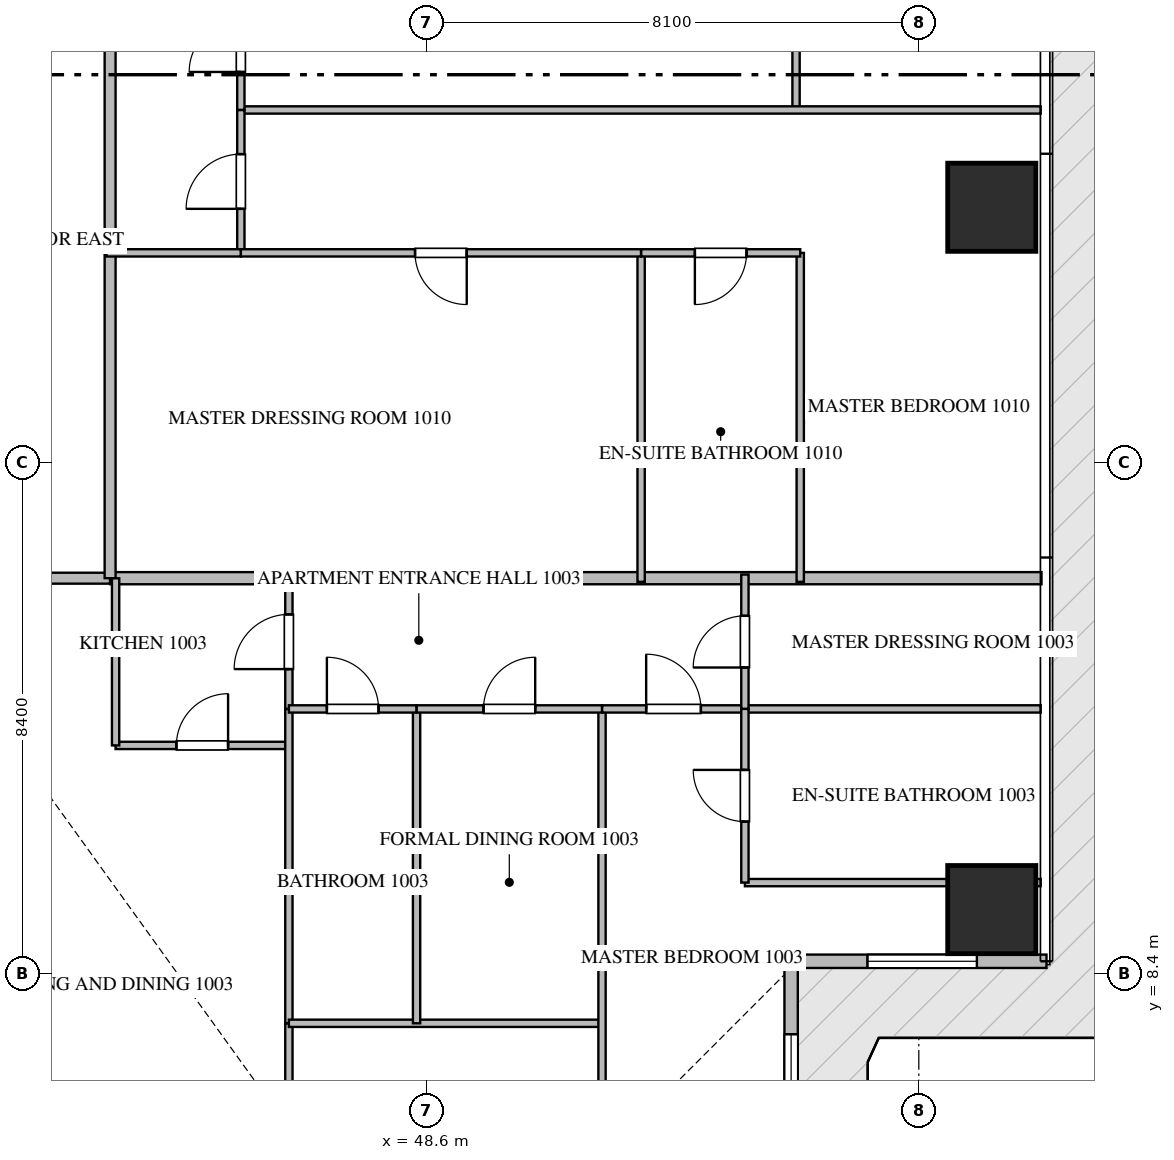
"""IFC4 building model, lengths in metres.
Left out: names, types, materials, properties, quantities, classifications, styles, units other than length and angle.
Written with IfcOpenShell. Run it as: python <this file> out.ifc"""

import sys

from ifc_helpers import new_model, si_unit, direction, frame, frame_2d, origin, origin_2d, place, context, subcontext, project, spatial, rectangle, extrude, source, transform, mapped, element, fill, save


model = new_model("IFC4")
c1 = context("Model", 3, precision=1e-05, world=origin(), true_north=direction((0.0, 1.0)))
c2 = subcontext(c1, "Body", "Model", "MODEL_VIEW")
j1 = project(units=[si_unit("LENGTHUNIT", "METRE"), si_unit("PLANEANGLEUNIT", "RADIAN")], contexts=[c1])
p1 = place(None, origin())
s1 = spatial("IfcSite", under=j1, at=p1, CompositionType="ELEMENT")
p2 = place(p1, origin())
s2 = spatial("IfcBuilding", under=s1, at=p2, CompositionType="ELEMENT")
p3 = place(p2, frame((0.0, 0.0, 45.45)))
s3 = spatial("IfcBuildingStorey", under=s2, at=p3, CompositionType="ELEMENT", Elevation=45.45)
m1 = source(origin(), c2, "Body", "SweptSolid", [
    extrude(rectangle(XDim=1.45, YDim=1.45, at=origin_2d()), origin(), (0.0, 0.0, 1.0), 3.75),
])
for number, where, z_axis, x_axis in (
    (1, (57.9, 9.45, -0.26), (0.0, 0.0, 1.0), (1.0, 0.0, 0.0)),
    (2, (57.9, 21.0, -0.26), (0.0, 0.0, 1.0), (1.0, 0.0, 0.0)),
):
    element("IfcColumn", number, at=place(p3, frame(where, z_axis=z_axis, x_axis=x_axis)), inside=s3, PredefinedType="COLUMN", context=c2, shape_type="MappedRepresentation", body=[
        mapped(m1, transform((0.0, 0.0, 0.0), scale=1.0)),
    ])
p4 = place(p3, frame((54.6, 4.51, 0.0), z_axis=(0.0, 0.0, 1.0), x_axis=(0.0, 1.0, 0.0)))
e3 = element("IfcWall", 3, at=p4, inside=s3, PredefinedType="ELEMENTEDWALL", context=c2, shape_type="SweptSolid", body=[
    extrude(rectangle(XDim=3.98, YDim=0.22, at=frame_2d((1.99, 0.0))), origin(), (0.0, 0.0, 1.0), 3.475),
])
p5 = place(p4, frame((1.09, 0.0, 0.65)))
e4 = element("IfcOpeningElement", 4, at=p5, cuts=e3, PredefinedType="OPENING", context=c2, shape_type="SweptSolid", body=[
    extrude(rectangle(XDim=1.8, YDim=2.1, at=frame_2d((0.9, 1.05))), frame((0.0, 0.12, 0.0), z_axis=(0.0, -1.0, 0.0), x_axis=(1.0, 0.0, 0.0)), (0.0, 0.0, 1.0), 0.24),
])
p6 = place(p3, frame((54.71, 8.6, 0.0), z_axis=(0.0, 0.0, 1.0), x_axis=(1.0, 0.0, 0.0)))
e5 = element("IfcWall", 5, at=p6, inside=s3, PredefinedType="ELEMENTEDWALL", context=c2, shape_type="SweptSolid", body=[
    extrude(rectangle(XDim=4.09, YDim=0.22, at=frame_2d((2.045, 0.0))), origin(), (0.0, 0.0, 1.0), 3.475),
])
p7 = place(p6, frame((1.145, 0.0, 0.65)))
e6 = element("IfcOpeningElement", 6, at=p7, cuts=e5, PredefinedType="OPENING", context=c2, shape_type="SweptSolid", body=[
    extrude(rectangle(XDim=1.8, YDim=2.1, at=frame_2d((0.9, 1.05))), frame((0.0, 0.12, 0.0), z_axis=(0.0, -1.0, 0.0), x_axis=(1.0, 0.0, 0.0)), (0.0, 0.0, 1.0), 0.24),
])
p8 = place(p3, frame((43.4, 14.9, 0.0), z_axis=(0.0, 0.0, 1.0), x_axis=(1.0, 0.0, 0.0)))
e7 = element("IfcWall", 7, at=p8, inside=s3, PredefinedType="PARTITIONING", context=c2, shape_type="SweptSolid", body=[
    extrude(rectangle(XDim=15.318, YDim=0.2, at=frame_2d((7.659, 0.0))), origin(), (0.0, 0.0, 1.0), 3.49),
])
p9 = place(p3, frame((21.402, 14.9, 0.0), z_axis=(0.0, 0.0, 1.0), x_axis=(1.0, 0.0, 0.0)))
e8 = element("IfcWall", 8, at=p9, inside=s3, PredefinedType="PARTITIONING", context=c2, shape_type="SweptSolid", body=[
    extrude(rectangle(XDim=21.996, YDim=0.18, at=frame_2d((10.998, 0.0))), origin(), (0.0, 0.0, 1.0), 3.49),
])
p10 = place(p9, frame((2.1, 0.0, 0.0)))
e9 = element("IfcOpeningElement", 9, at=p10, cuts=e8, PredefinedType="OPENING", context=c2, shape_type="SweptSolid", body=[
    extrude(rectangle(XDim=1.0, YDim=2.15, at=frame_2d((0.5, 1.075))), frame((0.0, 0.1, 0.0), z_axis=(0.0, -1.0, 0.0), x_axis=(1.0, 0.0, 0.0)), (0.0, 0.0, 1.0), 0.2),
])
p11 = place(p9, frame((14.319, 0.0, 0.0)))
e10 = element("IfcOpeningElement", 10, at=p11, cuts=e8, PredefinedType="OPENING", context=c2, shape_type="SweptSolid", body=[
    extrude(rectangle(XDim=1.0, YDim=2.15, at=frame_2d((0.5, 1.075))), frame((0.0, 0.1, 0.0), z_axis=(0.0, -1.0, 0.0), x_axis=(1.0, 0.0, 0.0)), (0.0, 0.0, 1.0), 0.2),
])
p12 = place(p9, frame((18.896, 0.0, 0.0)))
e11 = element("IfcOpeningElement", 11, at=p12, cuts=e8, PredefinedType="OPENING", context=c2, shape_type="SweptSolid", body=[
    extrude(rectangle(XDim=1.0, YDim=2.15, at=frame_2d((0.5, 1.075))), frame((0.0, 0.1, 0.0), z_axis=(0.0, -1.0, 0.0), x_axis=(1.0, 0.0, 0.0)), (0.0, 0.0, 1.0), 0.2),
])
p13 = place(p3, frame((43.4, 14.9, 0.0), z_axis=(0.0, 0.0, 1.0), x_axis=(0.0, 1.0, 0.0)))
e12 = element("IfcWall", 12, at=p13, inside=s3, PredefinedType="PARTITIONING", context=c2, shape_type="SweptSolid", body=[
    extrude(rectangle(XDim=20.6, YDim=0.18, at=frame_2d((10.3, 0.0))), origin(), (0.0, 0.0, 1.0), 3.49),
])
p14 = place(p13, frame((17.64, 0.0, 0.0)))
e13 = element("IfcOpeningElement", 13, at=p14, cuts=e12, PredefinedType="OPENING", context=c2, shape_type="SweptSolid", body=[
    extrude(rectangle(XDim=1.0, YDim=2.15, at=frame_2d((0.5, 1.075))), frame((0.0, 0.1, 0.0), z_axis=(0.0, -1.0, 0.0), x_axis=(1.0, 0.0, 0.0)), (0.0, 0.0, 1.0), 0.2),
])
p15 = place(p3, frame((43.49, 12.15, 0.0), z_axis=(0.0, 0.0, 1.0), x_axis=(1.0, 0.0, 0.0)))
e14 = element("IfcWall", 14, at=p15, inside=s3, PredefinedType="PARTITIONING", context=c2, shape_type="SweptSolid", body=[
    extrude(rectangle(XDim=2.85, YDim=0.12, at=frame_2d((1.425, 0.0))), origin(), (0.0, 0.0, 1.0), 3.49),
])
p16 = place(p15, frame((1.0, 0.0, 0.0)))
e15 = element("IfcOpeningElement", 15, at=p16, cuts=e14, PredefinedType="OPENING", context=c2, shape_type="SweptSolid", body=[
    extrude(rectangle(XDim=0.85, YDim=2.1, at=frame_2d((0.425, 1.05))), frame((0.0, 0.07, 0.0), z_axis=(0.0, -1.0, 0.0), x_axis=(1.0, 0.0, 0.0)), (0.0, 0.0, 1.0), 0.14),
])
p17 = place(p3, frame((43.49, 12.15, 0.0), z_axis=(0.0, 0.0, 1.0), x_axis=(0.0, 1.0, 0.0)))
e16 = element("IfcWall", 16, at=p17, inside=s3, PredefinedType="PARTITIONING", context=c2, shape_type="SweptSolid", body=[
    extrude(rectangle(XDim=2.748, YDim=0.12, at=frame_2d((1.374, 0.0))), origin(), (0.0, 0.0, 1.0), 3.49),
])
p18 = place(p3, frame((46.34, 12.75, 0.0), z_axis=(0.0, 0.0, 1.0), x_axis=(0.0, 1.0, 0.0)))
e17 = element("IfcWall", 17, at=p18, inside=s3, PredefinedType="PARTITIONING", context=c2, shape_type="SweptSolid", body=[
    extrude(rectangle(XDim=2.21, YDim=0.12, at=frame_2d((1.105, 0.0))), origin(), (0.0, 0.0, 1.0), 3.49),
])
p19 = place(p18, frame((0.655, 0.0, 0.0)))
e18 = element("IfcOpeningElement", 18, at=p19, cuts=e17, PredefinedType="OPENING", context=c2, shape_type="SweptSolid", body=[
    extrude(rectangle(XDim=0.9, YDim=2.1, at=frame_2d((0.45, 1.05))), frame((0.0, 0.07, 0.0), z_axis=(0.0, -1.0, 0.0), x_axis=(1.0, 0.0, 0.0)), (0.0, 0.0, 1.0), 0.14),
])
p20 = place(p3, frame((46.34, 0.295, 0.0), z_axis=(0.0, 0.0, 1.0), x_axis=(0.0, 1.0, 0.0)))
e19 = element("IfcWall", 19, at=p20, inside=s3, PredefinedType="PARTITIONING", context=c2, shape_type="SweptSolid", body=[
    extrude(rectangle(XDim=7.285, YDim=0.12, at=frame_2d((3.643, 0.0))), origin(), (0.0, 0.0, 1.0), 3.49),
])
p21 = place(p20, frame((3.512, 0.0, 0.0)))
e20 = element("IfcOpeningElement", 20, at=p21, cuts=e19, PredefinedType="OPENING", context=c2, shape_type="SweptSolid", body=[
    extrude(rectangle(XDim=0.9, YDim=2.1, at=frame_2d((0.45, 1.05))), frame((0.0, 0.07, 0.0), z_axis=(0.0, -1.0, 0.0), x_axis=(1.0, 0.0, 0.0)), (0.0, 0.0, 1.0), 0.14),
])
p22 = place(p3, frame((46.34, 7.582, 0.0), z_axis=(0.0, 0.0, 1.0), x_axis=(0.0, 1.0, 0.0)))
e21 = element("IfcWall", 21, at=p22, inside=s3, PredefinedType="PARTITIONING", context=c2, shape_type="SweptSolid", body=[
    extrude(rectangle(XDim=5.166, YDim=0.12, at=frame_2d((2.583, 0.0))), origin(), (0.0, 0.0, 1.0), 3.49),
])
p23 = place(p3, frame((46.34, 7.58, 0.0), z_axis=(0.0, 0.0, 1.0), x_axis=(1.0, 0.0, 0.0)))
e22 = element("IfcWall", 22, at=p23, inside=s3, PredefinedType="PARTITIONING", context=c2, shape_type="SweptSolid", body=[
    extrude(rectangle(XDim=5.15, YDim=0.12, at=frame_2d((2.575, 0.0))), origin(), (0.0, 0.0, 1.0), 3.49),
])
p24 = place(p3, frame((51.49, 4.495, 0.0), z_axis=(0.0, 0.0, 1.0), x_axis=(0.0, 1.0, 0.0)))
e23 = element("IfcWall", 23, at=p24, inside=s3, PredefinedType="PARTITIONING", context=c2, shape_type="SweptSolid", body=[
    extrude(rectangle(XDim=8.255, YDim=0.12, at=frame_2d((4.127, 0.0))), origin(), (0.0, 0.0, 1.0), 3.49),
])
p25 = place(p3, frame((48.44, 7.58, 0.0), z_axis=(0.0, 0.0, 1.0), x_axis=(0.0, 1.0, 0.0)))
e24 = element("IfcWall", 24, at=p25, inside=s3, PredefinedType="PARTITIONING", context=c2, shape_type="SweptSolid", body=[
    extrude(rectangle(XDim=5.17, YDim=0.12, at=frame_2d((2.585, 0.0))), origin(), (0.0, 0.0, 1.0), 3.49),
])
p26 = place(p3, frame((46.34, 12.75, 0.0), z_axis=(0.0, 0.0, 1.0), x_axis=(1.0, 0.0, 0.0)))
e25 = element("IfcWall", 25, at=p26, inside=s3, PredefinedType="PARTITIONING", context=c2, shape_type="SweptSolid", body=[
    extrude(rectangle(XDim=2.1, YDim=0.12, at=frame_2d((1.05, 0.0))), origin(), (0.0, 0.0, 1.0), 3.49),
])
p27 = place(p26, frame((0.625, 0.0, 0.0)))
e26 = element("IfcOpeningElement", 26, at=p27, cuts=e25, PredefinedType="OPENING", context=c2, shape_type="SweptSolid", body=[
    extrude(rectangle(XDim=0.85, YDim=2.1, at=frame_2d((0.425, 1.05))), frame((0.0, 0.07, 0.0), z_axis=(0.0, -1.0, 0.0), x_axis=(1.0, 0.0, 0.0)), (0.0, 0.0, 1.0), 0.14),
])
p28 = place(p3, frame((48.442, 12.75, 0.0), z_axis=(0.0, 0.0, 1.0), x_axis=(1.0, 0.0, 0.0)))
e27 = element("IfcWall", 27, at=p28, inside=s3, PredefinedType="PARTITIONING", context=c2, shape_type="SweptSolid", body=[
    extrude(rectangle(XDim=3.048, YDim=0.12, at=frame_2d((1.524, 0.0))), origin(), (0.0, 0.0, 1.0), 3.49),
])
p29 = place(p28, frame((1.099, 0.0, 0.0)))
e28 = element("IfcOpeningElement", 28, at=p29, cuts=e27, PredefinedType="OPENING", context=c2, shape_type="SweptSolid", body=[
    extrude(rectangle(XDim=0.85, YDim=2.1, at=frame_2d((0.425, 1.05))), frame((0.0, 0.07, 0.0), z_axis=(0.0, -1.0, 0.0), x_axis=(1.0, 0.0, 0.0)), (0.0, 0.0, 1.0), 0.14),
])
p30 = place(p3, frame((51.492, 12.75, 0.0), z_axis=(0.0, 0.0, 1.0), x_axis=(1.0, 0.0, 0.0)))
e29 = element("IfcWall", 29, at=p30, inside=s3, PredefinedType="PARTITIONING", context=c2, shape_type="SweptSolid", body=[
    extrude(rectangle(XDim=2.348, YDim=0.12, at=frame_2d((1.174, 0.0))), origin(), (0.0, 0.0, 1.0), 3.49),
])
p31 = place(p30, frame((0.724, 0.0, 0.0)))
e30 = element("IfcOpeningElement", 30, at=p31, cuts=e29, PredefinedType="OPENING", context=c2, shape_type="SweptSolid", body=[
    extrude(rectangle(XDim=0.9, YDim=2.1, at=frame_2d((0.45, 1.05))), frame((0.0, 0.07, 0.0), z_axis=(0.0, -1.0, 0.0), x_axis=(1.0, 0.0, 0.0)), (0.0, 0.0, 1.0), 0.14),
])
p32 = place(p3, frame((53.84, 9.894, 0.0), z_axis=(0.0, 0.0, 1.0), x_axis=(1.0, 0.0, 0.0)))
e31 = element("IfcWall", 31, at=p32, inside=s3, PredefinedType="PARTITIONING", context=c2, shape_type="SweptSolid", body=[
    extrude(rectangle(XDim=4.865, YDim=0.12, at=frame_2d((2.433, 0.0))), origin(), (0.0, 0.0, 1.0), 3.49),
])
p33 = place(p3, frame((53.842, 12.75, 0.0), z_axis=(0.0, 0.0, 1.0), x_axis=(1.0, 0.0, 0.0)))
e32 = element("IfcWall", 32, at=p33, inside=s3, PredefinedType="PARTITIONING", context=c2, shape_type="SweptSolid", body=[
    extrude(rectangle(XDim=4.863, YDim=0.12, at=frame_2d((2.432, 0.0))), origin(), (0.0, 0.0, 1.0), 3.49),
])
p34 = place(p3, frame((53.84, 9.894, 0.0), z_axis=(0.0, 0.0, 1.0), x_axis=(0.0, 1.0, 0.0)))
e33 = element("IfcWall", 33, at=p34, inside=s3, PredefinedType="PARTITIONING", context=c2, shape_type="SweptSolid", body=[
    extrude(rectangle(XDim=2.856, YDim=0.12, at=frame_2d((1.428, 0.0))), origin(), (0.0, 0.0, 1.0), 3.49),
])
p35 = place(p34, frame((1.003, 0.0, 0.0)))
e34 = element("IfcOpeningElement", 34, at=p35, cuts=e33, PredefinedType="OPENING", context=c2, shape_type="SweptSolid", body=[
    extrude(rectangle(XDim=0.85, YDim=2.1, at=frame_2d((0.425, 1.05))), frame((0.0, 0.07, 0.0), z_axis=(0.0, -1.0, 0.0), x_axis=(1.0, 0.0, 0.0)), (0.0, 0.0, 1.0), 0.14),
])
p36 = place(p3, frame((53.84, 12.752, 0.0), z_axis=(0.0, 0.0, 1.0), x_axis=(0.0, 1.0, 0.0)))
e35 = element("IfcWall", 35, at=p36, inside=s3, PredefinedType="PARTITIONING", context=c2, shape_type="SweptSolid", body=[
    extrude(rectangle(XDim=2.208, YDim=0.12, at=frame_2d((1.104, 0.0))), origin(), (0.0, 0.0, 1.0), 3.49),
])
p37 = place(p36, frame((0.679, 0.0, 0.0)))
e36 = element("IfcOpeningElement", 36, at=p37, cuts=e35, PredefinedType="OPENING", context=c2, shape_type="SweptSolid", body=[
    extrude(rectangle(XDim=0.85, YDim=2.1, at=frame_2d((0.425, 1.05))), frame((0.0, 0.07, 0.0), z_axis=(0.0, -1.0, 0.0), x_axis=(1.0, 0.0, 0.0)), (0.0, 0.0, 1.0), 0.14),
])
p38 = place(p3, frame((54.681, 22.6, 0.0), z_axis=(0.0, 0.0, 1.0), x_axis=(0.0, 1.0, 0.0)))
e37 = element("IfcWall", 37, at=p38, inside=s3, PredefinedType="PARTITIONING", context=c2, shape_type="SweptSolid", body=[
    extrude(rectangle(XDim=5.07, YDim=0.12, at=frame_2d((2.535, 0.0))), origin(), (0.0, 0.0, 1.0), 3.49),
])
p39 = place(p3, frame((58.705, 22.6, 0.0), z_axis=(0.0, 0.0, 1.0), x_axis=(-1.0, 0.0, 0.0)))
e38 = element("IfcWall", 38, at=p39, inside=s3, PredefinedType="PARTITIONING", context=c2, shape_type="SweptSolid", body=[
    extrude(rectangle(XDim=13.155, YDim=0.12, at=frame_2d((6.578, 0.0))), origin(), (0.0, 0.0, 1.0), 3.49),
])
p40 = place(p3, frame((45.55, 22.6, 0.0), z_axis=(0.0, 0.0, 1.0), x_axis=(0.0, 1.0, 0.0)))
e39 = element("IfcWall", 39, at=p40, inside=s3, PredefinedType="PARTITIONING", context=c2, shape_type="SweptSolid", body=[
    extrude(rectangle(XDim=2.1, YDim=0.12, at=frame_2d((1.05, 0.0))), origin(), (0.0, 0.0, 1.0), 3.49),
])
p41 = place(p40, frame((0.625, 0.0, 0.0)))
e40 = element("IfcOpeningElement", 40, at=p41, cuts=e39, PredefinedType="OPENING", context=c2, shape_type="SweptSolid", body=[
    extrude(rectangle(XDim=0.85, YDim=2.1, at=frame_2d((0.425, 1.05))), frame((0.0, 0.07, 0.0), z_axis=(0.0, -1.0, 0.0), x_axis=(1.0, 0.0, 0.0)), (0.0, 0.0, 1.0), 0.14),
])
p42 = place(p3, frame((45.55, 20.25, 0.0), z_axis=(0.0, 0.0, 1.0), x_axis=(0.0, 1.0, 0.0)))
e41 = element("IfcWall", 41, at=p42, inside=s3, PredefinedType="PARTITIONING", context=c2, shape_type="SweptSolid", body=[
    extrude(rectangle(XDim=2.348, YDim=0.12, at=frame_2d((1.174, 0.0))), origin(), (0.0, 0.0, 1.0), 3.49),
])
p43 = place(p42, frame((0.724, 0.0, 0.0)))
e42 = element("IfcOpeningElement", 42, at=p43, cuts=e41, PredefinedType="OPENING", context=c2, shape_type="SweptSolid", body=[
    extrude(rectangle(XDim=0.9, YDim=2.1, at=frame_2d((0.45, 1.05))), frame((0.0, 0.07, 0.0), z_axis=(0.0, -1.0, 0.0), x_axis=(1.0, 0.0, 0.0)), (0.0, 0.0, 1.0), 0.14),
])
for number, where, z_axis, x_axis in (
    (43, (54.75, 14.84, 0.0), (0.0, 0.0, 1.0), (0.0, 1.0, 0.0)),
    (44, (52.133, 14.84, 0.0), (0.0, 0.0, 1.0), (0.0, 1.0, 0.0)),
):
    element("IfcWall", number, at=place(p3, frame(where, z_axis=z_axis, x_axis=x_axis)), inside=s3, PredefinedType="PARTITIONING", context=c2, shape_type="SweptSolid", body=[
        extrude(rectangle(XDim=5.41, YDim=0.12, at=frame_2d((2.705, 0.0))), origin(), (0.0, 0.0, 1.0), 3.49),
    ])
p44 = place(p3, frame((54.75, 20.25, 0.0), z_axis=(0.0, 0.0, 1.0), x_axis=(-1.0, 0.0, 0.0)))
e45 = element("IfcWall", 45, at=p44, inside=s3, PredefinedType="PARTITIONING", context=c2, shape_type="SweptSolid", body=[
    extrude(rectangle(XDim=2.617, YDim=0.12, at=frame_2d((1.309, 0.0))), origin(), (0.0, 0.0, 1.0), 3.49),
])
p45 = place(p44, frame((0.883, 0.0, 0.0)))
e46 = element("IfcOpeningElement", 46, at=p45, cuts=e45, PredefinedType="OPENING", context=c2, shape_type="SweptSolid", body=[
    extrude(rectangle(XDim=0.85, YDim=2.1, at=frame_2d((0.425, 1.05))), frame((0.0, 0.07, 0.0), z_axis=(0.0, -1.0, 0.0), x_axis=(1.0, 0.0, 0.0)), (0.0, 0.0, 1.0), 0.14),
])
p46 = place(p3, frame((52.131, 20.25, 0.0), z_axis=(0.0, 0.0, 1.0), x_axis=(-1.0, 0.0, 0.0)))
e47 = element("IfcWall", 47, at=p46, inside=s3, PredefinedType="PARTITIONING", context=c2, shape_type="SweptSolid", body=[
    extrude(rectangle(XDim=6.581, YDim=0.12, at=frame_2d((3.291, 0.0))), origin(), (0.0, 0.0, 1.0), 3.49),
])
p47 = place(p46, frame((2.866, 0.0, 0.0)))
e48 = element("IfcOpeningElement", 48, at=p47, cuts=e47, PredefinedType="OPENING", context=c2, shape_type="SweptSolid", body=[
    extrude(rectangle(XDim=0.85, YDim=2.1, at=frame_2d((0.425, 1.05))), frame((0.0, 0.07, 0.0), z_axis=(0.0, -1.0, 0.0), x_axis=(1.0, 0.0, 0.0)), (0.0, 0.0, 1.0), 0.14),
])
p48 = place(p3, frame((45.548, 20.25, 0.0), z_axis=(0.0, 0.0, 1.0), x_axis=(-1.0, 0.0, 0.0)))
e49 = element("IfcWall", 49, at=p48, inside=s3, PredefinedType="PARTITIONING", context=c2, shape_type="SweptSolid", body=[
    extrude(rectangle(XDim=2.208, YDim=0.12, at=frame_2d((1.104, 0.0))), origin(), (0.0, 0.0, 1.0), 3.49),
])
m2 = source(origin(), c2, "Body", "SweptSolid", [
    extrude(rectangle(XDim=1.8, YDim=2.1, at=frame_2d((0.9, 1.05))), frame((0.0, 0.03, 0.0), z_axis=(0.0, -1.0, 0.0), x_axis=(1.0, 0.0, 0.0)), (0.0, 0.0, 1.0), 0.06),
])
p49 = place(p5, origin())
e50 = element("IfcWindow", 50, at=p49, inside=s3, PartitioningType="SINGLE_PANEL", PredefinedType="WINDOW", context=c2, shape_type="MappedRepresentation", body=[
    mapped(m2, transform((0.0, 0.0, 0.0), scale=1.0)),
])
fill(e4, e50)
p50 = place(p7, origin())
e51 = element("IfcWindow", 51, at=p50, inside=s3, PartitioningType="SINGLE_PANEL", PredefinedType="WINDOW", context=c2, shape_type="MappedRepresentation", body=[
    mapped(m2, transform((0.0, 0.0, 0.0), scale=1.0)),
])
fill(e6, e51)
m3 = source(origin(), c2, "Body", "SweptSolid", [
    extrude(rectangle(XDim=0.85, YDim=2.1, at=frame_2d((0.425, 1.05))), frame((0.0, 0.025, 0.0), z_axis=(0.0, -1.0, 0.0), x_axis=(1.0, 0.0, 0.0)), (0.0, 0.0, 1.0), 0.05),
])
p51 = place(p16, origin())
e52 = element("IfcDoor", 52, at=p51, inside=s3, OperationType="SINGLE_SWING_RIGHT", PredefinedType="DOOR", context=c2, shape_type="MappedRepresentation", body=[
    mapped(m3, transform((0.0, 0.0, 0.0), scale=1.0)),
])
fill(e15, e52)
m4 = source(origin(), c2, "Body", "SweptSolid", [
    extrude(rectangle(XDim=0.9, YDim=2.1, at=frame_2d((0.45, 1.05))), frame((0.0, 0.025, 0.0), z_axis=(0.0, -1.0, 0.0), x_axis=(1.0, 0.0, 0.0)), (0.0, 0.0, 1.0), 0.05),
])
p52 = place(p19, origin())
e53 = element("IfcDoor", 53, at=p52, inside=s3, OperationType="SINGLE_SWING_LEFT", PredefinedType="DOOR", context=c2, shape_type="MappedRepresentation", body=[
    mapped(m4, transform((0.0, 0.0, 0.0), scale=1.0)),
])
fill(e18, e53)
p53 = place(p27, origin())
e54 = element("IfcDoor", 54, at=p53, inside=s3, OperationType="SINGLE_SWING_LEFT", PredefinedType="DOOR", context=c2, shape_type="MappedRepresentation", body=[
    mapped(m3, transform((0.0, 0.0, 0.0), scale=1.0)),
])
fill(e26, e54)
p54 = place(p29, origin())
e55 = element("IfcDoor", 55, at=p54, inside=s3, OperationType="SINGLE_SWING_RIGHT", PredefinedType="DOOR", context=c2, shape_type="MappedRepresentation", body=[
    mapped(m3, transform((0.0, 0.0, 0.0), scale=1.0)),
])
fill(e28, e55)
p55 = place(p31, origin())
e56 = element("IfcDoor", 56, at=p55, inside=s3, OperationType="SINGLE_SWING_LEFT", PredefinedType="DOOR", context=c2, shape_type="MappedRepresentation", body=[
    mapped(m4, transform((0.0, 0.0, 0.0), scale=1.0)),
])
fill(e30, e56)
p56 = place(p35, origin())
e57 = element("IfcDoor", 57, at=p56, inside=s3, OperationType="SINGLE_SWING_RIGHT", PredefinedType="DOOR", context=c2, shape_type="MappedRepresentation", body=[
    mapped(m3, transform((0.0, 0.0, 0.0), scale=1.0)),
])
fill(e34, e57)
p57 = place(p37, origin())
e58 = element("IfcDoor", 58, at=p57, inside=s3, OperationType="SINGLE_SWING_LEFT", PredefinedType="DOOR", context=c2, shape_type="MappedRepresentation", body=[
    mapped(m3, transform((0.0, 0.0, 0.0), scale=1.0)),
])
fill(e36, e58)
p58 = place(p41, origin())
e59 = element("IfcDoor", 59, at=p58, inside=s3, OperationType="SINGLE_SWING_LEFT", PredefinedType="DOOR", context=c2, shape_type="MappedRepresentation", body=[
    mapped(m3, transform((0.0, 0.0, 0.0), scale=1.0)),
])
fill(e40, e59)
p59 = place(p43, origin())
e60 = element("IfcDoor", 60, at=p59, inside=s3, OperationType="SINGLE_SWING_LEFT", PredefinedType="DOOR", context=c2, shape_type="MappedRepresentation", body=[
    mapped(m4, transform((0.0, 0.0, 0.0), scale=1.0)),
])
fill(e42, e60)
p60 = place(p45, origin())
e61 = element("IfcDoor", 61, at=p60, inside=s3, OperationType="SINGLE_SWING_RIGHT", PredefinedType="DOOR", context=c2, shape_type="MappedRepresentation", body=[
    mapped(m3, transform((0.0, 0.0, 0.0), scale=1.0)),
])
fill(e46, e61)
p61 = place(p47, origin())
e62 = element("IfcDoor", 62, at=p61, inside=s3, OperationType="SINGLE_SWING_LEFT", PredefinedType="DOOR", context=c2, shape_type="MappedRepresentation", body=[
    mapped(m3, transform((0.0, 0.0, 0.0), scale=1.0)),
])
fill(e48, e62)
save(model, sys.argv[1])
